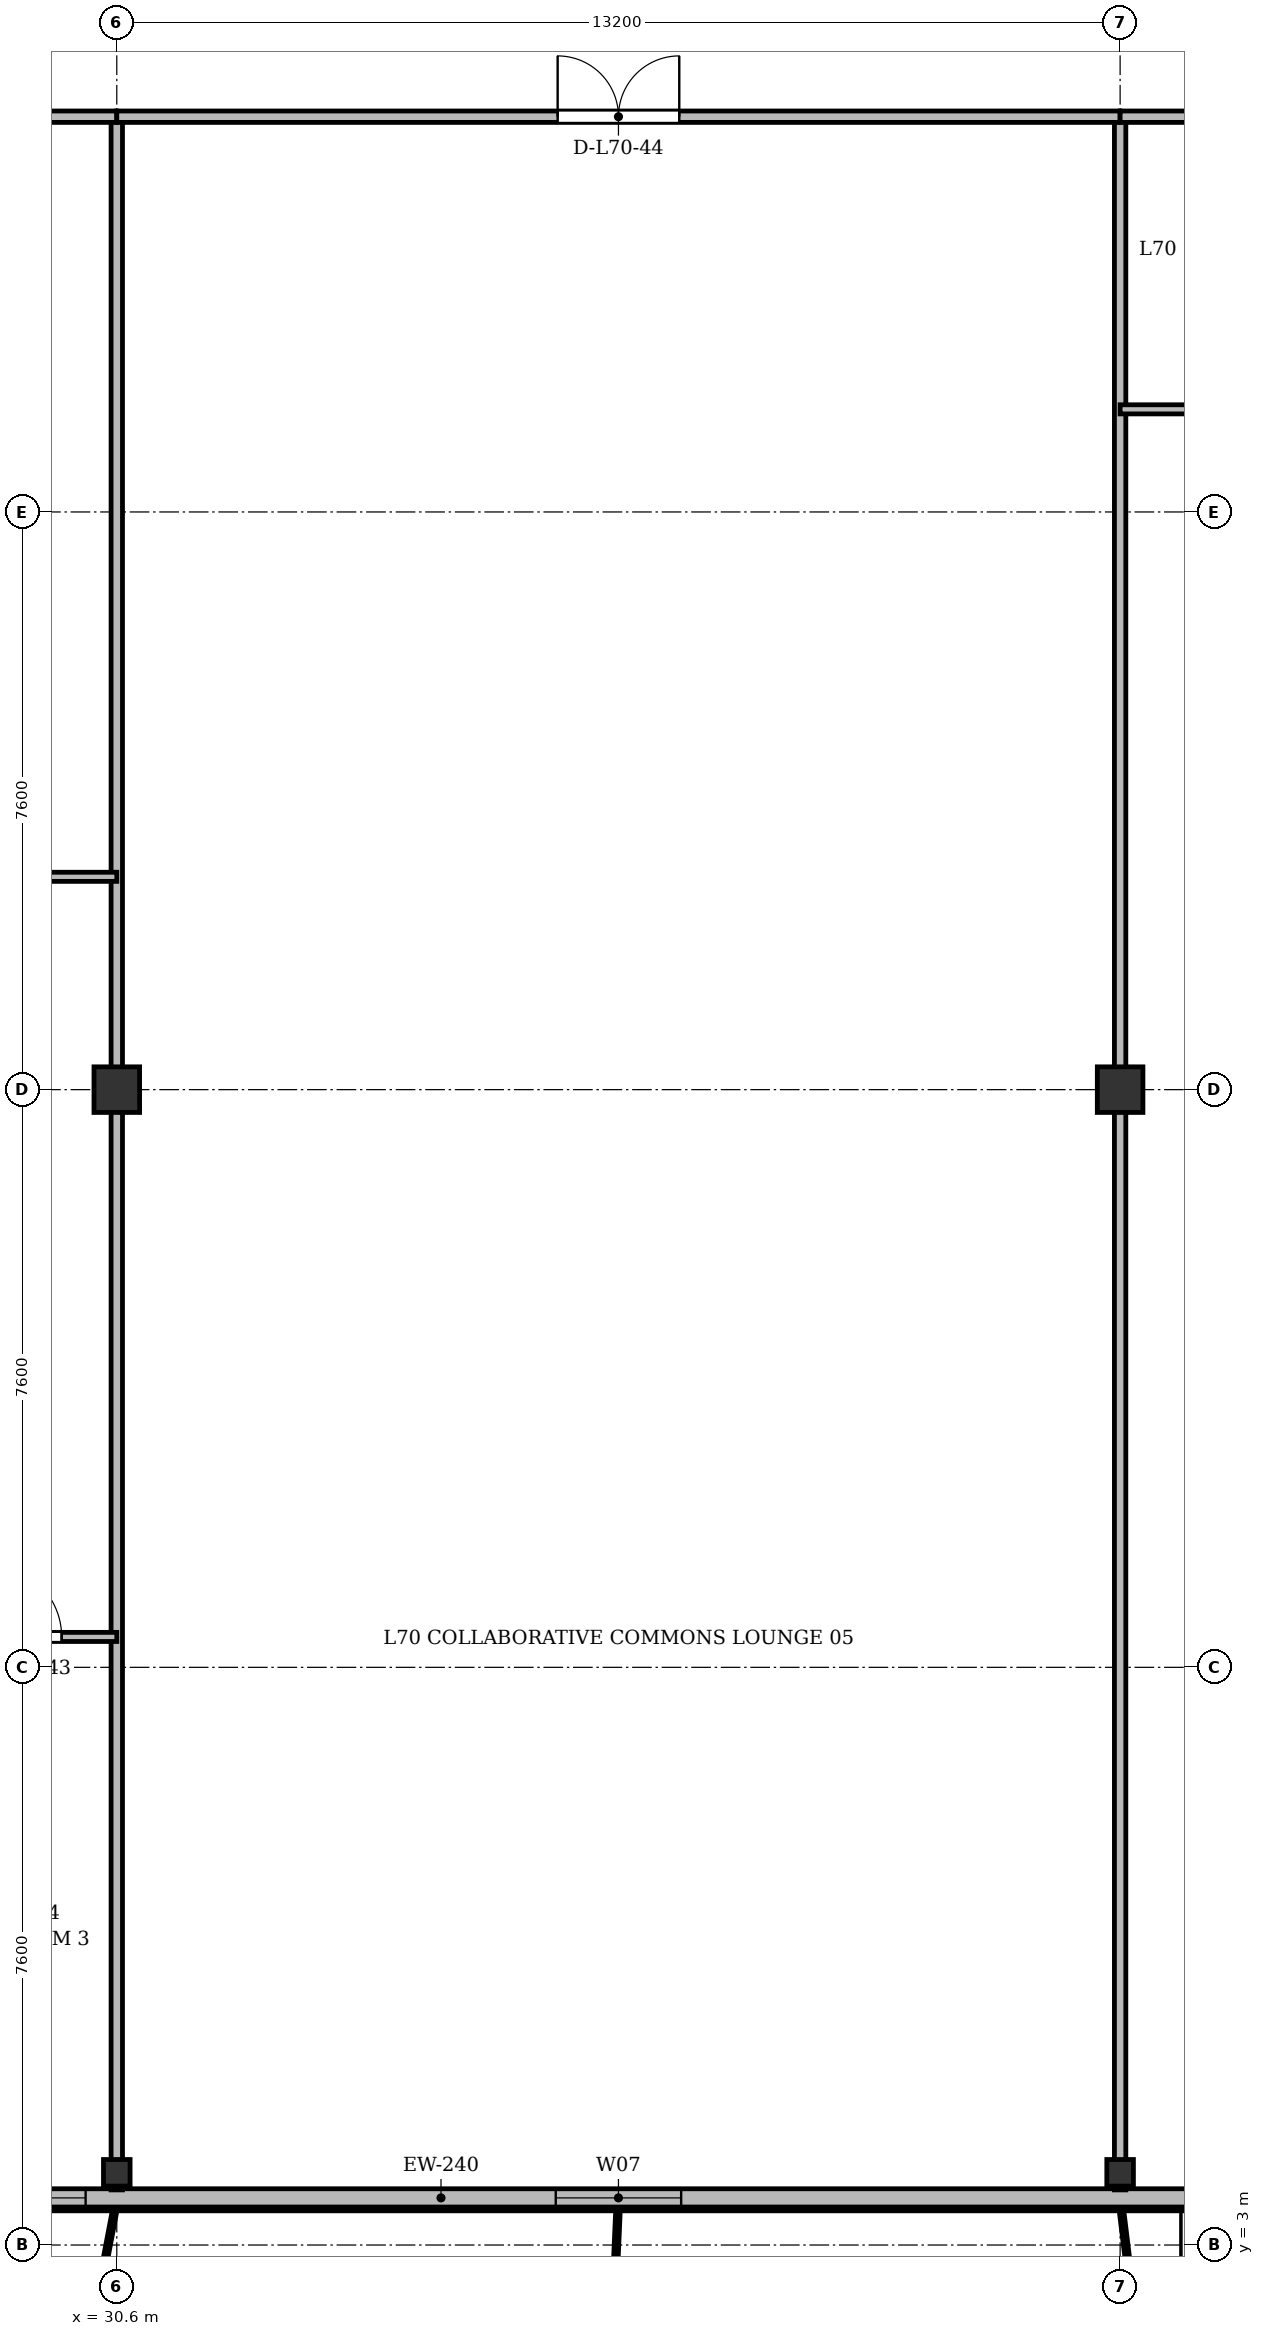
"""IFC4 building model, lengths in metres.
Left out: names, types, materials, properties, quantities, classifications, styles, units other than length and angle.
Written with IfcOpenShell. Run it as: python <this file> out.ifc"""

import sys

from ifc_helpers import new_model, si_unit, direction, frame, frame_2d, origin, origin_2d, place, context, subcontext, project, spatial, rectangle, i_section, extrude, source, transform, mapped, element, fill, save


model = new_model("IFC4")
c1 = context("Model", 3, precision=1e-05, world=origin(), true_north=direction((0.0, 1.0)))
c2 = subcontext(c1, "Body", "Model", "MODEL_VIEW")
j1 = project(units=[si_unit("LENGTHUNIT", "METRE"), si_unit("PLANEANGLEUNIT", "RADIAN")], contexts=[c1])
p1 = place(None, origin())
s1 = spatial("IfcSite", under=j1, at=p1, CompositionType="ELEMENT")
p2 = place(p1, origin())
s2 = spatial("IfcBuilding", under=s1, at=p2, CompositionType="ELEMENT")
p3 = place(p2, frame((0.0, 0.0, 270.3)))
s3 = spatial("IfcBuildingStorey", under=s2, at=p3, CompositionType="ELEMENT", Elevation=270.3)
m1 = source(origin(), c2, "Body", "SweptSolid", [
    extrude(i_section(OverallWidth=0.35, OverallDepth=0.35, WebThickness=0.018, FlangeThickness=0.028, at=origin_2d()), origin(), (0.0, 0.0, 1.0), 3.6),
])
p4 = place(p3, frame((30.6, 3.95, 0.0), z_axis=(0.0, 0.0, 1.0), x_axis=(1.0, 0.0, 0.0)))
e1 = element("IfcColumn", 1, at=p4, inside=s3, PredefinedType="COLUMN", context=c2, shape_type="MappedRepresentation", body=[
    mapped(m1, transform((0.0, 0.0, 0.0), x_axis=(1.0, 0.0, 0.0), y_axis=(0.0, 1.0, 0.0), z_axis=(0.0, 0.0, 1.0), scale=1.0)),
])
m2 = source(origin(), c2, "Body", "SweptSolid", [
    extrude(rectangle(XDim=0.6, YDim=0.6, at=origin_2d()), origin(), (0.0, 0.0, 1.0), 3.6),
])
p5 = place(p3, frame((30.6, 18.2, 0.0), z_axis=(0.0, 0.0, 1.0), x_axis=(1.0, 0.0, 0.0)))
e2 = element("IfcColumn", 2, at=p5, inside=s3, PredefinedType="COLUMN", context=c2, shape_type="MappedRepresentation", body=[
    mapped(m2, transform((0.0, 0.0, 0.0), x_axis=(1.0, 0.0, 0.0), y_axis=(0.0, 1.0, 0.0), z_axis=(0.0, 0.0, 1.0), scale=1.0)),
])
p6 = place(p3, frame((43.8, 3.95, 0.0), z_axis=(0.0, 0.0, 1.0), x_axis=(1.0, 0.0, 0.0)))
e3 = element("IfcColumn", 3, at=p6, inside=s3, PredefinedType="COLUMN", context=c2, shape_type="MappedRepresentation", body=[
    mapped(m1, transform((0.0, 0.0, 0.0), x_axis=(1.0, 0.0, 0.0), y_axis=(0.0, 1.0, 0.0), z_axis=(0.0, 0.0, 1.0), scale=1.0)),
])
p7 = place(p3, frame((43.8, 18.2, 0.0), z_axis=(0.0, 0.0, 1.0), x_axis=(1.0, 0.0, 0.0)))
e4 = element("IfcColumn", 4, at=p7, inside=s3, PredefinedType="COLUMN", context=c2, shape_type="MappedRepresentation", body=[
    mapped(m2, transform((0.0, 0.0, 0.0), x_axis=(1.0, 0.0, 0.0), y_axis=(0.0, 1.0, 0.0), z_axis=(0.0, 0.0, 1.0), scale=1.0)),
])
p8 = place(p3, frame((63.2, 3.62, 0.0), z_axis=(0.0, 0.0, 1.0), x_axis=(-1.0, 0.0, 0.0)))
e5 = element("IfcWall", 5, at=p8, inside=s3, PredefinedType="SOLIDWALL", context=c2, shape_type="SweptSolid", body=[
    extrude(rectangle(XDim=52.0, YDim=0.24, at=frame_2d((26.0, 0.0))), origin(), (0.0, 0.0, 1.0), 3.37),
])
p9 = place(p8, frame((1.345, 0.0, 0.9)))
e6 = element("IfcOpeningElement", 6, at=p9, cuts=e5, PredefinedType="OPENING", context=c2, shape_type="SweptSolid", body=[
    extrude(rectangle(XDim=1.8, YDim=1.8, at=frame_2d((0.9, 0.9))), frame((0.0, 0.13, 0.0), z_axis=(0.0, -1.0, 0.0), x_axis=(1.0, 0.0, 0.0)), (0.0, 0.0, 1.0), 0.26),
])
p10 = place(p8, frame((5.1, 0.0, 0.9)))
e7 = element("IfcOpeningElement", 7, at=p10, cuts=e5, PredefinedType="OPENING", context=c2, shape_type="SweptSolid", body=[
    extrude(rectangle(XDim=2.2, YDim=1.8, at=frame_2d((1.1, 0.9))), frame((0.0, 0.13, 0.0), z_axis=(0.0, -1.0, 0.0), x_axis=(1.0, 0.0, 0.0)), (0.0, 0.0, 1.0), 0.26),
])
p11 = place(p8, frame((9.35, 0.0, 0.9)))
e8 = element("IfcOpeningElement", 8, at=p11, cuts=e5, PredefinedType="OPENING", context=c2, shape_type="SweptSolid", body=[
    extrude(rectangle(XDim=1.5, YDim=1.75, at=frame_2d((0.75, 0.875))), frame((0.0, 0.13, 0.0), z_axis=(0.0, -1.0, 0.0), x_axis=(1.0, 0.0, 0.0)), (0.0, 0.0, 1.0), 0.26),
])
p12 = place(p8, frame((14.017, 0.0, 0.0)))
e9 = element("IfcOpeningElement", 9, at=p12, cuts=e5, PredefinedType="OPENING", context=c2, shape_type="SweptSolid", body=[
    extrude(rectangle(XDim=1.2, YDim=2.2, at=frame_2d((0.6, 1.1))), frame((0.0, 0.13, 0.0), z_axis=(0.0, -1.0, 0.0), x_axis=(1.0, 0.0, 0.0)), (0.0, 0.0, 1.0), 0.26),
])
p13 = place(p8, frame((25.175, 0.0, 0.9)))
e10 = element("IfcOpeningElement", 10, at=p13, cuts=e5, PredefinedType="OPENING", context=c2, shape_type="SweptSolid", body=[
    extrude(rectangle(XDim=1.65, YDim=1.85, at=frame_2d((0.825, 0.925))), frame((0.0, 0.13, 0.0), z_axis=(0.0, -1.0, 0.0), x_axis=(1.0, 0.0, 0.0)), (0.0, 0.0, 1.0), 0.26),
])
p14 = place(p8, frame((33.01, 0.0, 0.9)))
e11 = element("IfcOpeningElement", 11, at=p14, cuts=e5, PredefinedType="OPENING", context=c2, shape_type="SweptSolid", body=[
    extrude(rectangle(XDim=1.8, YDim=1.8, at=frame_2d((0.9, 0.9))), frame((0.0, 0.13, 0.0), z_axis=(0.0, -1.0, 0.0), x_axis=(1.0, 0.0, 0.0)), (0.0, 0.0, 1.0), 0.26),
])
p15 = place(p8, frame((35.45, 0.0, 0.9)))
e12 = element("IfcOpeningElement", 12, at=p15, cuts=e5, PredefinedType="OPENING", context=c2, shape_type="SweptSolid", body=[
    extrude(rectangle(XDim=1.5, YDim=1.75, at=frame_2d((0.75, 0.875))), frame((0.0, 0.13, 0.0), z_axis=(0.0, -1.0, 0.0), x_axis=(1.0, 0.0, 0.0)), (0.0, 0.0, 1.0), 0.26),
])
p16 = place(p8, frame((37.85, 0.0, 0.9)))
e13 = element("IfcOpeningElement", 13, at=p16, cuts=e5, PredefinedType="OPENING", context=c2, shape_type="SweptSolid", body=[
    extrude(rectangle(XDim=1.5, YDim=1.75, at=frame_2d((0.75, 0.875))), frame((0.0, 0.13, 0.0), z_axis=(0.0, -1.0, 0.0), x_axis=(1.0, 0.0, 0.0)), (0.0, 0.0, 1.0), 0.26),
])
p17 = place(p8, frame((41.452, 0.0, 0.0)))
e14 = element("IfcOpeningElement", 14, at=p17, cuts=e5, PredefinedType="OPENING", context=c2, shape_type="SweptSolid", body=[
    extrude(rectangle(XDim=1.2, YDim=2.2, at=frame_2d((0.6, 1.1))), frame((0.0, 0.13, 0.0), z_axis=(0.0, -1.0, 0.0), x_axis=(1.0, 0.0, 0.0)), (0.0, 0.0, 1.0), 0.26),
])
p18 = place(p8, frame((44.575, 0.0, 0.9)))
e15 = element("IfcOpeningElement", 15, at=p18, cuts=e5, PredefinedType="OPENING", context=c2, shape_type="SweptSolid", body=[
    extrude(rectangle(XDim=1.65, YDim=1.85, at=frame_2d((0.825, 0.925))), frame((0.0, 0.13, 0.0), z_axis=(0.0, -1.0, 0.0), x_axis=(1.0, 0.0, 0.0)), (0.0, 0.0, 1.0), 0.26),
])
p19 = place(p8, frame((48.855, 0.0, 0.9)))
e16 = element("IfcOpeningElement", 16, at=p19, cuts=e5, PredefinedType="OPENING", context=c2, shape_type="SweptSolid", body=[
    extrude(rectangle(XDim=1.8, YDim=1.8, at=frame_2d((0.9, 0.9))), frame((0.0, 0.13, 0.0), z_axis=(0.0, -1.0, 0.0), x_axis=(1.0, 0.0, 0.0)), (0.0, 0.0, 1.0), 0.26),
])
for number, where, z_axis, x_axis in (
    (17, (30.6, 3.725, 0.0), (0.0, 0.0, 1.0), (0.0, 1.0, 0.0)),
    (18, (43.8, 3.725, 0.0), (0.0, 0.0, 1.0), (0.0, 1.0, 0.0)),
):
    element("IfcWall", number, at=place(p3, frame(where, z_axis=z_axis, x_axis=x_axis)), inside=s3, PredefinedType="PARTITIONING", context=c2, shape_type="SweptSolid", body=[
        extrude(rectangle(XDim=27.275, YDim=0.15, at=frame_2d((13.637, 0.0))), origin(), (0.0, 0.0, 1.0), 2.87),
    ])
p20 = place(p3, frame((23.4, 21.0, 0.0), z_axis=(0.0, 0.0, 1.0), x_axis=(1.0, 0.0, 0.0)))
e19 = element("IfcWall", 19, at=p20, inside=s3, PredefinedType="PARTITIONING", context=c2, shape_type="SweptSolid", body=[
    extrude(rectangle(XDim=7.2, YDim=0.12, at=frame_2d((3.6, 0.0))), origin(), (0.0, 0.0, 1.0), 2.87),
])
p21 = place(p20, frame((3.125, 0.0, 0.0)))
e20 = element("IfcOpeningElement", 20, at=p21, cuts=e19, PredefinedType="OPENING", context=c2, shape_type="SweptSolid", body=[
    extrude(rectangle(XDim=0.95, YDim=2.15, at=frame_2d((0.475, 1.075))), frame((0.0, 0.07, 0.0), z_axis=(0.0, -1.0, 0.0), x_axis=(1.0, 0.0, 0.0)), (0.0, 0.0, 1.0), 0.14),
])
p22 = place(p3, frame((23.4, 31.0, 0.0), z_axis=(0.0, 0.0, 1.0), x_axis=(1.0, 0.0, 0.0)))
e21 = element("IfcWall", 21, at=p22, inside=s3, PredefinedType="PARTITIONING", context=c2, shape_type="SweptSolid", body=[
    extrude(rectangle(XDim=7.2, YDim=0.15, at=frame_2d((3.6, 0.0))), origin(), (0.0, 0.0, 1.0), 2.87),
])
p23 = place(p22, frame((4.706, 0.0, 0.0)))
e22 = element("IfcOpeningElement", 22, at=p23, cuts=e21, PredefinedType="OPENING", context=c2, shape_type="SweptSolid", body=[
    extrude(rectangle(XDim=0.95, YDim=2.15, at=frame_2d((0.475, 1.075))), frame((0.0, 0.085, 0.0), z_axis=(0.0, -1.0, 0.0), x_axis=(1.0, 0.0, 0.0)), (0.0, 0.0, 1.0), 0.17),
])
p24 = place(p3, frame((28.2, 11.0, 0.0), z_axis=(0.0, 0.0, 1.0), x_axis=(1.0, 0.0, 0.0)))
e23 = element("IfcWall", 23, at=p24, inside=s3, PredefinedType="PARTITIONING", context=c2, shape_type="SweptSolid", body=[
    extrude(rectangle(XDim=2.4, YDim=0.12, at=frame_2d((1.2, 0.0))), origin(), (0.0, 0.0, 1.0), 2.87),
])
p25 = place(p24, frame((0.725, 0.0, 0.0)))
e24 = element("IfcOpeningElement", 24, at=p25, cuts=e23, PredefinedType="OPENING", context=c2, shape_type="SweptSolid", body=[
    extrude(rectangle(XDim=0.95, YDim=2.15, at=frame_2d((0.475, 1.075))), frame((0.0, 0.07, 0.0), z_axis=(0.0, -1.0, 0.0), x_axis=(1.0, 0.0, 0.0)), (0.0, 0.0, 1.0), 0.14),
])
p26 = place(p3, frame((30.6, 31.0, 0.0), z_axis=(0.0, 0.0, 1.0), x_axis=(1.0, 0.0, 0.0)))
e25 = element("IfcWall", 25, at=p26, inside=s3, PredefinedType="PARTITIONING", context=c2, shape_type="SweptSolid", body=[
    extrude(rectangle(XDim=13.2, YDim=0.15, at=frame_2d((6.6, 0.0))), origin(), (0.0, 0.0, 1.0), 2.87),
])
p27 = place(p26, frame((5.8, 0.0, 0.0)))
e26 = element("IfcOpeningElement", 26, at=p27, cuts=e25, PredefinedType="OPENING", context=c2, shape_type="SweptSolid", body=[
    extrude(rectangle(XDim=1.6, YDim=2.2, at=frame_2d((0.8, 1.1))), frame((0.0, 0.085, 0.0), z_axis=(0.0, -1.0, 0.0), x_axis=(1.0, 0.0, 0.0)), (0.0, 0.0, 1.0), 0.17),
])
p28 = place(p3, frame((43.8, 31.0, 0.0), z_axis=(0.0, 0.0, 1.0), x_axis=(1.0, 0.0, 0.0)))
e27 = element("IfcWall", 27, at=p28, inside=s3, PredefinedType="PARTITIONING", context=c2, shape_type="SweptSolid", body=[
    extrude(rectangle(XDim=7.2, YDim=0.15, at=frame_2d((3.6, 0.0))), origin(), (0.0, 0.0, 1.0), 2.87),
])
p29 = place(p28, frame((3.125, 0.0, 0.0)))
e28 = element("IfcOpeningElement", 28, at=p29, cuts=e27, PredefinedType="OPENING", context=c2, shape_type="SweptSolid", body=[
    extrude(rectangle(XDim=0.95, YDim=2.15, at=frame_2d((0.475, 1.075))), frame((0.0, 0.085, 0.0), z_axis=(0.0, -1.0, 0.0), x_axis=(1.0, 0.0, 0.0)), (0.0, 0.0, 1.0), 0.17),
])
p30 = place(p3, frame((43.8, 27.15, 0.0), z_axis=(0.0, 0.0, 1.0), x_axis=(1.0, 0.0, 0.0)))
e29 = element("IfcWall", 29, at=p30, inside=s3, PredefinedType="PARTITIONING", context=c2, shape_type="SweptSolid", body=[
    extrude(rectangle(XDim=7.2, YDim=0.12, at=frame_2d((3.6, 0.0))), origin(), (0.0, 0.0, 1.0), 2.87),
])
p31 = place(p30, frame((3.125, 0.0, 0.0)))
e30 = element("IfcOpeningElement", 30, at=p31, cuts=e29, PredefinedType="OPENING", context=c2, shape_type="SweptSolid", body=[
    extrude(rectangle(XDim=0.95, YDim=2.15, at=frame_2d((0.475, 1.075))), frame((0.0, 0.07, 0.0), z_axis=(0.0, -1.0, 0.0), x_axis=(1.0, 0.0, 0.0)), (0.0, 0.0, 1.0), 0.14),
])
m3 = source(origin(), c2, "Body", "SweptSolid", [
    extrude(rectangle(XDim=1.65, YDim=1.85, at=frame_2d((0.825, 0.925))), frame((0.0, 0.03, 0.0), z_axis=(0.0, -1.0, 0.0), x_axis=(1.0, 0.0, 0.0)), (0.0, 0.0, 1.0), 0.06),
])
p32 = place(p13, origin())
e31 = element("IfcWindow", 31, at=p32, inside=s3, PartitioningType="SINGLE_PANEL", PredefinedType="WINDOW", context=c2, shape_type="MappedRepresentation", body=[
    mapped(m3, transform((0.0, 0.0, 0.0), x_axis=(1.0, 0.0, 0.0), y_axis=(0.0, 1.0, 0.0), z_axis=(0.0, 0.0, 1.0), scale=1.0)),
])
fill(e10, e31)
m4 = source(origin(), c2, "Body", "SweptSolid", [
    extrude(rectangle(XDim=1.8, YDim=1.8, at=frame_2d((0.9, 0.9))), frame((0.0, 0.03, 0.0), z_axis=(0.0, -1.0, 0.0), x_axis=(1.0, 0.0, 0.0)), (0.0, 0.0, 1.0), 0.06),
])
p33 = place(p14, origin())
e32 = element("IfcWindow", 32, at=p33, inside=s3, PartitioningType="SINGLE_PANEL", PredefinedType="WINDOW", context=c2, shape_type="MappedRepresentation", body=[
    mapped(m4, transform((0.0, 0.0, 0.0), x_axis=(1.0, 0.0, 0.0), y_axis=(0.0, 1.0, 0.0), z_axis=(0.0, 0.0, 1.0), scale=1.0)),
])
fill(e11, e32)
m5 = source(origin(), c2, "Body", "SweptSolid", [
    extrude(rectangle(XDim=0.95, YDim=2.15, at=frame_2d((0.475, 1.075))), frame((0.0, 0.025, 0.0), z_axis=(0.0, -1.0, 0.0), x_axis=(1.0, 0.0, 0.0)), (0.0, 0.0, 1.0), 0.05),
])
p34 = place(p25, origin())
e33 = element("IfcDoor", 33, at=p34, inside=s3, OperationType="SINGLE_SWING_LEFT", PredefinedType="DOOR", context=c2, shape_type="MappedRepresentation", body=[
    mapped(m5, transform((0.0, 0.0, 0.0), x_axis=(1.0, 0.0, 0.0), y_axis=(0.0, 1.0, 0.0), z_axis=(0.0, 0.0, 1.0), scale=1.0)),
])
fill(e24, e33)
m6 = source(origin(), c2, "Body", "SweptSolid", [
    extrude(rectangle(XDim=1.6, YDim=2.2, at=frame_2d((0.8, 1.1))), frame((0.0, 0.025, 0.0), z_axis=(0.0, -1.0, 0.0), x_axis=(1.0, 0.0, 0.0)), (0.0, 0.0, 1.0), 0.05),
])
p35 = place(p27, origin())
e34 = element("IfcDoor", 34, at=p35, inside=s3, OperationType="DOUBLE_DOOR_SINGLE_SWING", PredefinedType="DOOR", context=c2, shape_type="MappedRepresentation", body=[
    mapped(m6, transform((0.0, 0.0, 0.0), x_axis=(1.0, 0.0, 0.0), y_axis=(0.0, 1.0, 0.0), z_axis=(0.0, 0.0, 1.0), scale=1.0)),
])
fill(e26, e34)
save(model, sys.argv[1])
